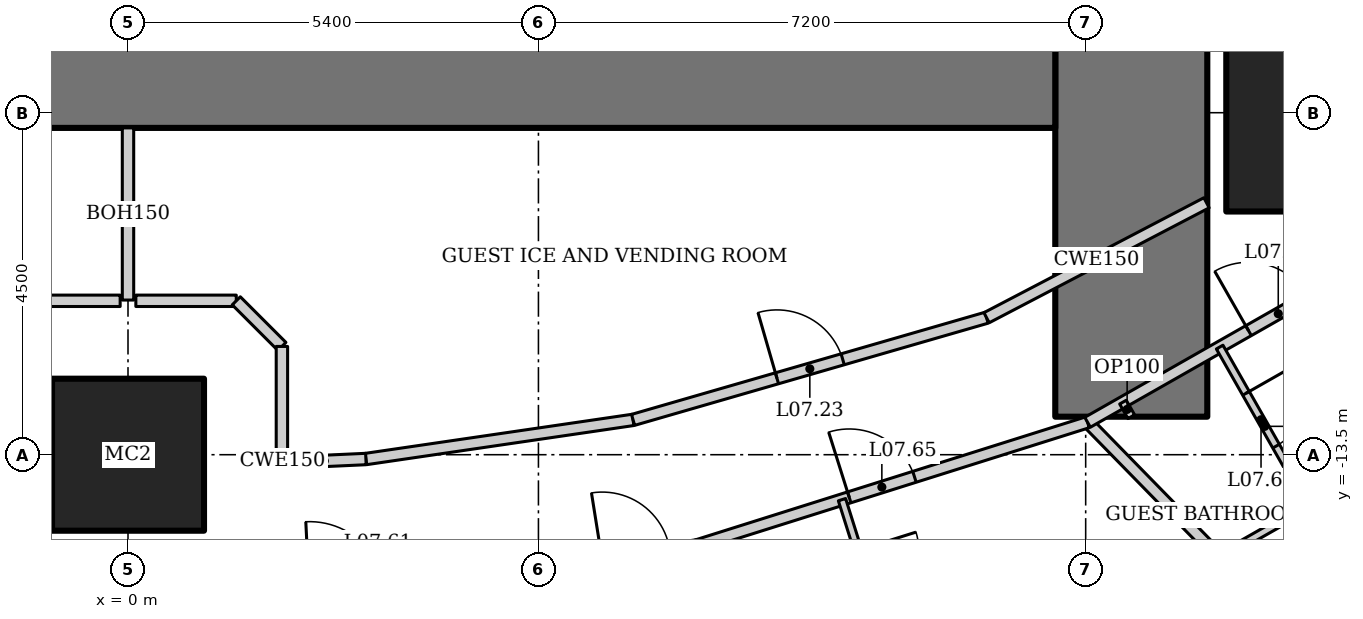
"""IFC4 building model, lengths in metres.
Left out: names, types, materials, properties, quantities, classifications, styles, units other than length and angle.
Written with IfcOpenShell. Run it as: python <this file> out.ifc"""

import sys

from ifc_helpers import new_model, si_unit, direction, frame, frame_2d, origin, origin_2d, place, context, subcontext, project, spatial, rectangle, hollow_rectangle, extrude, element, fill, save


model = new_model("IFC4")
c1 = context("Model", 3, precision=1e-05, world=origin(), true_north=direction((0.0, 1.0)))
c2 = subcontext(c1, "Body", "Model", "MODEL_VIEW")
j1 = project(units=[si_unit("LENGTHUNIT", "METRE"), si_unit("PLANEANGLEUNIT", "RADIAN")], contexts=[c1])
p1 = place(None, origin())
s1 = spatial("IfcSite", under=j1, at=p1, CompositionType="ELEMENT")
p2 = place(p1, origin())
s2 = spatial("IfcBuilding", under=s1, at=p2, CompositionType="ELEMENT")
p3 = place(p2, frame((0.0, 0.0, 40.6)))
s3 = spatial("IfcBuildingStorey", under=s2, at=p3, CompositionType="ELEMENT", Elevation=40.6)
p4 = place(p3, frame((0.0, -13.5, 0.0), z_axis=(0.0, 0.0, 1.0), x_axis=(1.0, 0.0, 0.0)))
e1 = element("IfcColumn", 1, at=p4, inside=s3, PredefinedType="COLUMN", context=c2, shape_type="SweptSolid", body=[
    extrude(hollow_rectangle(XDim=2.0, YDim=2.0, WallThickness=0.17, at=origin_2d()), origin(), (0.0, 0.0, 1.0), 3.6),
])
p5 = place(p3, frame((15.75, -9.0, 0.0), z_axis=(0.0, 0.0, 1.0), x_axis=(1.0, 0.0, 0.0)))
e2 = element("IfcColumn", 2, at=p5, inside=s3, PredefinedType="COLUMN", context=c2, shape_type="SweptSolid", body=[
    extrude(hollow_rectangle(XDim=2.6, YDim=2.6, WallThickness=0.13, at=origin_2d()), origin(), (0.0, 0.0, 1.0), 3.6),
])
p6 = place(p3, frame((13.2, -13.0, 0.0), z_axis=(0.0, 0.0, 1.0), x_axis=(0.0, 1.0, 0.0)))
e3 = element("IfcWall", 3, at=p6, inside=s3, PredefinedType="SHEAR", context=c2, shape_type="SweptSolid", body=[
    extrude(rectangle(XDim=26.0, YDim=2.0, at=frame_2d((13.0, 0.0))), origin(), (0.0, 0.0, 1.0), 3.6),
])
p7 = place(p6, frame((12.1, 0.0, 0.0)))
e4 = element("IfcOpeningElement", 4, at=p7, cuts=e3, PredefinedType="OPENING", context=c2, shape_type="SweptSolid", body=[
    extrude(rectangle(XDim=1.8, YDim=2.1, at=frame_2d((0.9, 1.05))), frame((0.0, 1.01, 0.0), z_axis=(0.0, -1.0, 0.0), x_axis=(1.0, 0.0, 0.0)), (0.0, 0.0, 1.0), 2.02),
])
p8 = place(p3, frame((-12.2, -8.0, 0.0), z_axis=(0.0, 0.0, 1.0), x_axis=(1.0, 0.0, 0.0)))
e5 = element("IfcWall", 5, at=p8, inside=s3, PredefinedType="SHEAR", context=c2, shape_type="SweptSolid", body=[
    extrude(rectangle(XDim=24.4, YDim=2.4, at=frame_2d((12.2, 0.0))), origin(), (0.0, 0.0, 1.0), 3.6),
])
p9 = place(p3, frame((17.97, -18.542, 0.0), z_axis=(0.0, 0.0, 1.0), x_axis=(-0.699032031211, 0.715090357467, 0.0)))
e6 = element("IfcWall", 6, at=p9, inside=s3, PredefinedType="PARTITIONING", context=c2, shape_type="SweptSolid", body=[
    extrude(rectangle(XDim=7.647, YDim=0.15, at=frame_2d((3.824, 0.0))), origin(), (0.0, 0.0, 1.0), 2.528),
])
p10 = place(p3, frame((7.486, -14.692, 0.0), z_axis=(0.0, 0.0, 1.0), x_axis=(0.953774229808, 0.30052407317, 0.0)))
e7 = element("IfcWall", 7, at=p10, inside=s3, PredefinedType="PARTITIONING", context=c2, shape_type="SweptSolid", body=[
    extrude(rectangle(XDim=5.388, YDim=0.15, at=frame_2d((2.694, 0.0))), origin(), (0.0, 0.0, 1.0), 3.45),
])
p11 = place(p10, frame((2.1, 0.0, 0.0)))
e8 = element("IfcOpeningElement", 8, at=p11, cuts=e7, PredefinedType="OPENING", context=c2, shape_type="SweptSolid", body=[
    extrude(rectangle(XDim=0.9, YDim=2.1, at=frame_2d((0.45, 1.05))), frame((0.0, 0.085, 0.0), z_axis=(0.0, -1.0, 0.0), x_axis=(1.0, 0.0, 0.0)), (0.0, 0.0, 1.0), 0.17),
])
p12 = place(p3, frame((12.625, -13.073, 0.0), z_axis=(0.0, 0.0, 1.0), x_axis=(0.86907565943, 0.494679187136, 0.0)))
e9 = element("IfcWall", 9, at=p12, inside=s3, PredefinedType="PARTITIONING", context=c2, shape_type="SweptSolid", body=[
    extrude(rectangle(XDim=5.911, YDim=0.15, at=frame_2d((2.955, 0.0))), origin(), (0.0, 0.0, 1.0), 3.45),
])
p13 = place(p12, frame((2.437, 0.0, 0.0)))
e10 = element("IfcOpeningElement", 10, at=p13, cuts=e9, PredefinedType="OPENING", context=c2, shape_type="SweptSolid", body=[
    extrude(rectangle(XDim=0.9, YDim=2.1, at=frame_2d((0.45, 1.05))), frame((0.0, 0.085, 0.0), z_axis=(0.0, -1.0, 0.0), x_axis=(1.0, 0.0, 0.0)), (0.0, 0.0, 1.0), 0.17),
])
p14 = place(p3, frame((3.13, -13.557, 0.0), z_axis=(0.0, 0.0, 1.0), x_axis=(0.989443047021, 0.14492224364, 0.0)))
e11 = element("IfcWall", 11, at=p14, inside=s3, PredefinedType="PARTITIONING", context=c2, shape_type="SweptSolid", body=[
    extrude(rectangle(XDim=3.553, YDim=0.15, at=frame_2d((1.776, 0.0))), origin(), (0.0, 0.0, 1.0), 3.45),
])
p15 = place(p3, frame((6.645, -13.042, 0.0), z_axis=(0.0, 0.0, 1.0), x_axis=(0.960678318068, 0.277663770041, 0.0)))
e12 = element("IfcWall", 12, at=p15, inside=s3, PredefinedType="PARTITIONING", context=c2, shape_type="SweptSolid", body=[
    extrude(rectangle(XDim=4.841, YDim=0.15, at=frame_2d((2.421, 0.0))), origin(), (0.0, 0.0, 1.0), 3.45),
])
p16 = place(p15, frame((1.971, 0.0, 0.0)))
e13 = element("IfcOpeningElement", 13, at=p16, cuts=e12, PredefinedType="OPENING", context=c2, shape_type="SweptSolid", body=[
    extrude(rectangle(XDim=0.9, YDim=2.1, at=frame_2d((0.45, 1.05))), frame((0.0, 0.085, 0.0), z_axis=(0.0, -1.0, 0.0), x_axis=(1.0, 0.0, 0.0)), (0.0, 0.0, 1.0), 0.17),
])
p17 = place(p3, frame((9.394, -14.091, 0.0), z_axis=(0.0, 0.0, 1.0), x_axis=(0.30049839721, -0.953782319649, 0.0)))
e14 = element("IfcWall", 14, at=p17, inside=s3, PredefinedType="PARTITIONING", context=c2, shape_type="SweptSolid", body=[
    extrude(rectangle(XDim=2.4, YDim=0.1, at=frame_2d((1.2, 0.0))), origin(), (0.0, 0.0, 1.0), 3.45),
])
p18 = place(p17, frame((0.7, 0.0, 0.0)))
e15 = element("IfcOpeningElement", 15, at=p18, cuts=e14, PredefinedType="OPENING", context=c2, shape_type="SweptSolid", body=[
    extrude(rectangle(XDim=0.8, YDim=2.1, at=frame_2d((0.4, 1.05))), frame((0.0, 0.06, 0.0), z_axis=(0.0, -1.0, 0.0), x_axis=(1.0, 0.0, 0.0)), (0.0, 0.0, 1.0), 0.12),
])
p19 = place(p3, frame((14.363, -12.084, 0.0), z_axis=(0.0, 0.0, 1.0), x_axis=(0.494703113698, -0.869062039959, 0.0)))
e16 = element("IfcWall", 16, at=p19, inside=s3, PredefinedType="PARTITIONING", context=c2, shape_type="SweptSolid", body=[
    extrude(rectangle(XDim=2.4, YDim=0.1, at=frame_2d((1.2, 0.0))), origin(), (0.0, 0.0, 1.0), 3.45),
])
p20 = place(p19, frame((0.7, 0.0, 0.0)))
e17 = element("IfcOpeningElement", 17, at=p20, cuts=e16, PredefinedType="OPENING", context=c2, shape_type="SweptSolid", body=[
    extrude(rectangle(XDim=0.8, YDim=2.1, at=frame_2d((0.4, 1.05))), frame((0.0, 0.06, 0.0), z_axis=(0.0, -1.0, 0.0), x_axis=(1.0, 0.0, 0.0)), (0.0, 0.0, 1.0), 0.12),
])
p21 = place(p3, frame((15.55, -14.17, 0.0), z_axis=(0.0, 0.0, 1.0), x_axis=(-0.869065896633, -0.494696338485, 0.0)))
e18 = element("IfcWall", 18, at=p21, inside=s3, PredefinedType="PARTITIONING", context=c2, shape_type="SweptSolid", body=[
    extrude(rectangle(XDim=1.386, YDim=0.1, at=frame_2d((0.693, 0.0))), origin(), (0.0, 0.0, 1.0), 3.45),
])
p22 = place(p3, frame((13.2, -13.0, 0.0), z_axis=(0.0, 0.0, 1.0), x_axis=(-0.49435138335, 0.869262164011, 0.0)))
e19 = element("IfcWall", 19, at=p22, inside=s3, PredefinedType="PARTITIONING", context=c2, shape_type="SweptSolid", body=[
    extrude(rectangle(XDim=0.221, YDim=0.1, at=frame_2d((0.11, 0.0))), origin(), (0.0, 0.0, 1.0), 3.45),
])
p23 = place(p3, frame((2.035, -13.607, 0.0), z_axis=(0.0, 0.0, 1.0), x_axis=(0.998946843147, 0.045882508292, 0.0)))
e20 = element("IfcWall", 20, at=p23, inside=s3, PredefinedType="PARTITIONING", context=c2, shape_type="SweptSolid", body=[
    extrude(rectangle(XDim=1.096, YDim=0.15, at=frame_2d((0.548, 0.0))), origin(), (0.0, 0.0, 1.0), 3.45),
])
p24 = place(p3, frame((0.0, -9.2, 0.0), z_axis=(0.0, 0.0, 1.0), x_axis=(0.0, -1.0, 0.0)))
e21 = element("IfcWall", 21, at=p24, inside=s3, PredefinedType="PARTITIONING", context=c2, shape_type="SweptSolid", body=[
    extrude(rectangle(XDim=2.265, YDim=0.15, at=frame_2d((1.133, 0.0))), origin(), (0.0, 0.0, 1.0), 3.043),
])
for number, where, z_axis, x_axis in (
    (22, (-1.425, -11.475, 0.0), (0.0, 0.0, 1.0), (1.0, 0.0, 0.0)),
    (23, (0.103, -11.475, 0.0), (0.0, 0.0, 1.0), (1.0, 0.0, 0.0)),
):
    element("IfcWall", number, at=place(p3, frame(where, z_axis=z_axis, x_axis=x_axis)), inside=s3, PredefinedType="PARTITIONING", context=c2, shape_type="SweptSolid", body=[
        extrude(rectangle(XDim=1.321, YDim=0.15, at=frame_2d((0.661, 0.0))), origin(), (0.0, 0.0, 1.0), 3.45),
    ])
p25 = place(p3, frame((1.425, -11.475, 0.0), z_axis=(0.0, 0.0, 1.0), x_axis=(0.707106781187, -0.707106781187, 0.0)))
e24 = element("IfcWall", 24, at=p25, inside=s3, PredefinedType="PARTITIONING", context=c2, shape_type="SweptSolid", body=[
    extrude(rectangle(XDim=0.849, YDim=0.15, at=frame_2d((0.425, 0.0))), origin(), (0.0, 0.0, 1.0), 3.45),
])
p26 = place(p3, frame((2.025, -12.075, 0.0), z_axis=(0.0, 0.0, 1.0), x_axis=(0.0, -1.0, 0.0)))
e25 = element("IfcWall", 25, at=p26, inside=s3, PredefinedType="PARTITIONING", context=c2, shape_type="SweptSolid", body=[
    extrude(rectangle(XDim=1.427, YDim=0.15, at=frame_2d((0.714, 0.0))), origin(), (0.0, 0.0, 1.0), 2.749),
])
p27 = place(p3, frame((11.296, -11.698, 0.0), z_axis=(0.0, 0.0, 1.0), x_axis=(0.886283344337, 0.463143426544, 0.0)))
e26 = element("IfcWall", 26, at=p27, inside=s3, PredefinedType="PARTITIONING", context=c2, shape_type="SweptSolid", body=[
    extrude(rectangle(XDim=3.265, YDim=0.15, at=frame_2d((1.633, 0.0))), origin(), (0.0, 0.0, 1.0), 3.45),
])
p28 = place(p16, origin())
e27 = element("IfcDoor", 27, at=p28, inside=s3, OperationType="SINGLE_SWING_LEFT", PredefinedType="DOOR", context=c2, shape_type="SweptSolid", body=[
    extrude(rectangle(XDim=0.9, YDim=2.1, at=frame_2d((0.45, 1.05))), frame((0.0, 0.025, 0.0), z_axis=(0.0, -1.0, 0.0), x_axis=(1.0, 0.0, 0.0)), (0.0, 0.0, 1.0), 0.05),
])
fill(e13, e27)
p29 = place(p11, origin())
e28 = element("IfcDoor", 28, at=p29, inside=s3, OperationType="SINGLE_SWING_LEFT", PredefinedType="DOOR", context=c2, shape_type="SweptSolid", body=[
    extrude(rectangle(XDim=0.9, YDim=2.1, at=frame_2d((0.45, 1.05))), frame((0.0, 0.025, 0.0), z_axis=(0.0, -1.0, 0.0), x_axis=(1.0, 0.0, 0.0)), (0.0, 0.0, 1.0), 0.05),
])
fill(e8, e28)
p30 = place(p20, origin())
e29 = element("IfcDoor", 29, at=p30, inside=s3, OperationType="SINGLE_SWING_LEFT", PredefinedType="DOOR", context=c2, shape_type="SweptSolid", body=[
    extrude(rectangle(XDim=0.8, YDim=2.1, at=frame_2d((0.4, 1.05))), frame((0.0, 0.025, 0.0), z_axis=(0.0, -1.0, 0.0), x_axis=(1.0, 0.0, 0.0)), (0.0, 0.0, 1.0), 0.05),
])
fill(e17, e29)
p31 = place(p13, origin())
e30 = element("IfcDoor", 30, at=p31, inside=s3, OperationType="SINGLE_SWING_LEFT", PredefinedType="DOOR", context=c2, shape_type="SweptSolid", body=[
    extrude(rectangle(XDim=0.9, YDim=2.1, at=frame_2d((0.45, 1.05))), frame((0.0, 0.025, 0.0), z_axis=(0.0, -1.0, 0.0), x_axis=(1.0, 0.0, 0.0)), (0.0, 0.0, 1.0), 0.05),
])
fill(e10, e30)
save(model, sys.argv[1])
